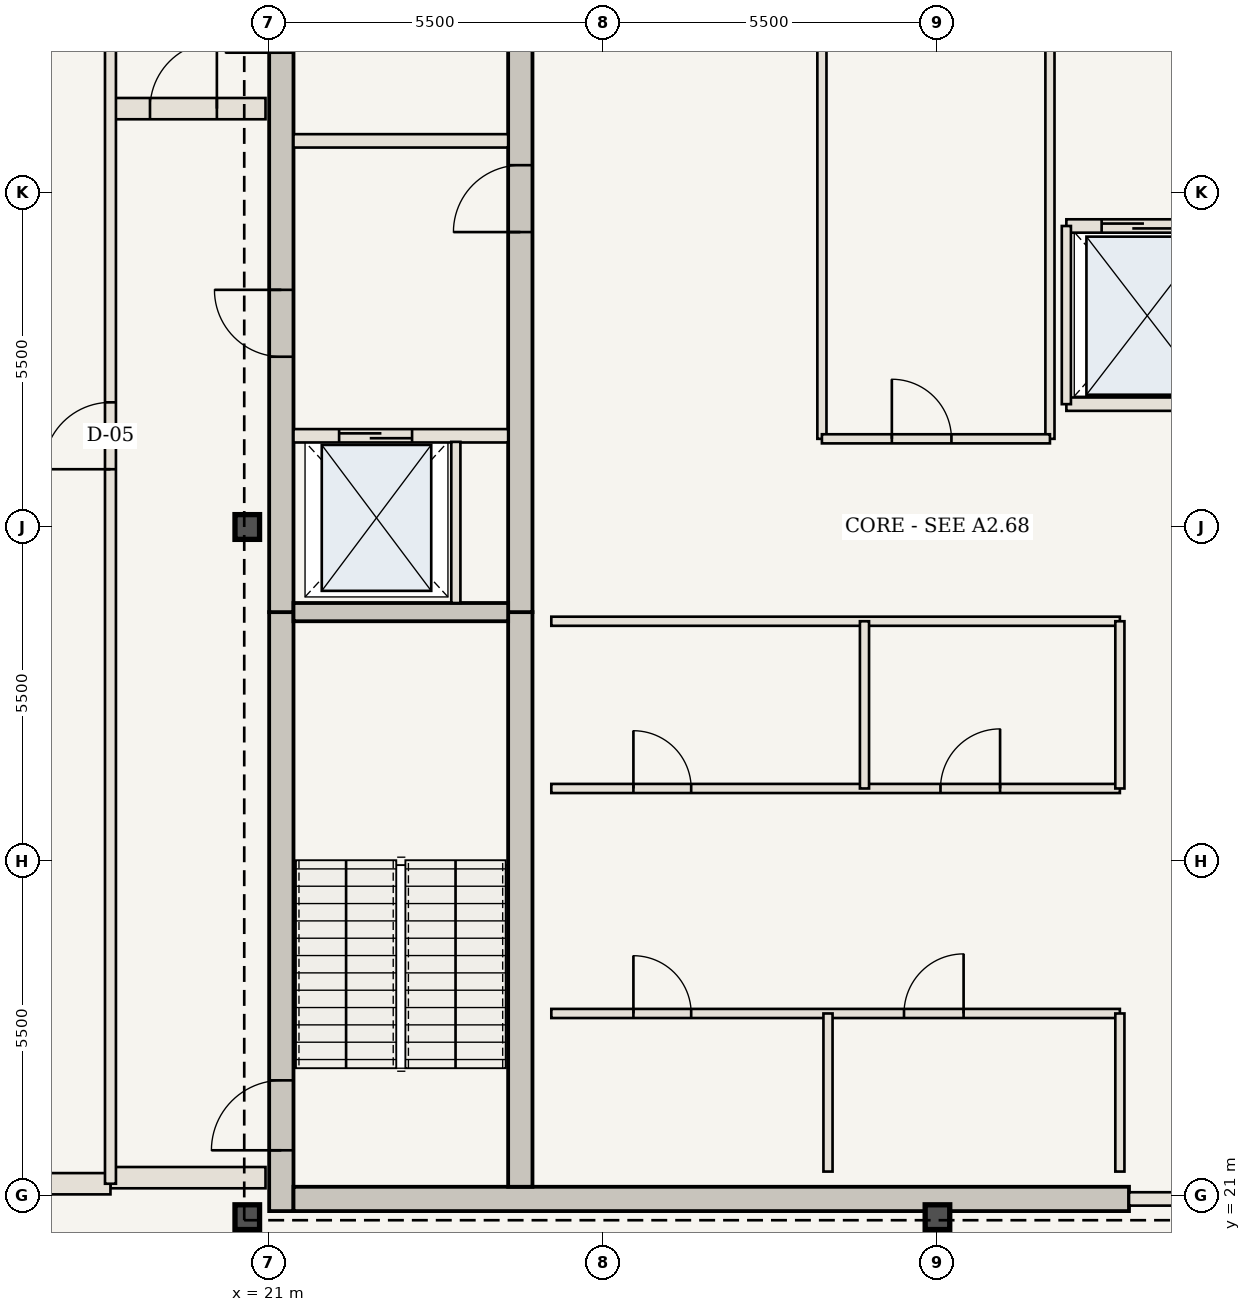
"""IFC4 building model, lengths in metres.
Left out: names, types, materials, properties, quantities, classifications, styles, units other than length and angle.
Written with IfcOpenShell. Run it as: python <this file> out.ifc"""

import sys

from ifc_helpers import new_model, si_unit, direction, frame, frame_2d, origin, origin_2d, place, context, subcontext, project, spatial, rectangle, i_section, extrude, element, fill, save


model = new_model("IFC4")
c1 = context("Model", 3, precision=1e-05, world=origin(), true_north=direction((0.0, 1.0)))
c2 = subcontext(c1, "Body", "Model", "MODEL_VIEW")
j1 = project(units=[si_unit("LENGTHUNIT", "METRE"), si_unit("PLANEANGLEUNIT", "RADIAN")], contexts=[c1])
p1 = place(None, origin())
s1 = spatial("IfcSite", under=j1, at=p1, CompositionType="ELEMENT")
p2 = place(p1, origin())
s2 = spatial("IfcBuilding", under=s1, at=p2, CompositionType="ELEMENT")
p3 = place(p2, frame((0.0, 0.0, 317.8)))
s3 = spatial("IfcBuildingStorey", under=s2, at=p3, CompositionType="ELEMENT", Elevation=317.8)
p4 = place(p3, frame((21.21, 20.75, 0.0), z_axis=(0.0, 0.0, 1.0), x_axis=(0.0, 1.0, 0.0)))
e1 = element("IfcWall", 1, at=p4, inside=s3, PredefinedType="SHEAR", context=c2, shape_type="SweptSolid", body=[
    extrude(rectangle(XDim=9.85, YDim=0.4, at=frame_2d((4.925, 0.0))), origin(), (0.0, 0.0, 1.0), 4.55),
])
p5 = place(p4, frame((1.0, 0.0, 0.0)))
e2 = element("IfcOpeningElement", 2, at=p5, cuts=e1, PredefinedType="OPENING", context=c2, shape_type="SweptSolid", body=[
    extrude(rectangle(XDim=1.15, YDim=2.15, at=frame_2d((0.575, 1.075))), frame((0.0, 0.21, 0.0), z_axis=(0.0, -1.0, 0.0), x_axis=(1.0, 0.0, 0.0)), (0.0, 0.0, 1.0), 0.42),
])
p6 = place(p3, frame((21.21, 30.6, 0.0), z_axis=(0.0, 0.0, 1.0), x_axis=(0.0, 1.0, 0.0)))
e3 = element("IfcWall", 3, at=p6, inside=s3, PredefinedType="SHEAR", context=c2, shape_type="SweptSolid", body=[
    extrude(rectangle(XDim=12.6, YDim=0.4, at=frame_2d((6.3, 0.0))), origin(), (0.0, 0.0, 1.0), 4.55),
])
p7 = place(p6, frame((4.2, 0.0, 0.0)))
e4 = element("IfcOpeningElement", 4, at=p7, cuts=e3, PredefinedType="OPENING", context=c2, shape_type="SweptSolid", body=[
    extrude(rectangle(XDim=1.1, YDim=2.15, at=frame_2d((0.55, 1.075))), frame((0.0, 0.21, 0.0), z_axis=(0.0, -1.0, 0.0), x_axis=(1.0, 0.0, 0.0)), (0.0, 0.0, 1.0), 0.42),
])
p8 = place(p6, frame((9.2, 0.0, 0.0)))
e5 = element("IfcOpeningElement", 5, at=p8, cuts=e3, PredefinedType="OPENING", context=c2, shape_type="SweptSolid", body=[
    extrude(rectangle(XDim=0.92, YDim=2.1, at=frame_2d((0.46, 1.05))), frame((0.0, 0.21, 0.0), z_axis=(0.0, -1.0, 0.0), x_axis=(1.0, 0.0, 0.0)), (0.0, 0.0, 1.0), 0.42),
])
p9 = place(p3, frame((21.41, 20.95, 0.0), z_axis=(0.0, 0.0, 1.0), x_axis=(1.0, 0.0, 0.0)))
e6 = element("IfcWall", 6, at=p9, inside=s3, PredefinedType="SHEAR", context=c2, shape_type="SweptSolid", body=[
    extrude(rectangle(XDim=13.74, YDim=0.4, at=frame_2d((6.87, 0.0))), origin(), (0.0, 0.0, 1.0), 4.55),
])
p10 = place(p3, frame((25.14, 21.15, 0.0), z_axis=(0.0, 0.0, 1.0), x_axis=(0.0, 1.0, 0.0)))
e7 = element("IfcWall", 7, at=p10, inside=s3, PredefinedType="SHEAR", context=c2, shape_type="SweptSolid", body=[
    extrude(rectangle(XDim=9.45, YDim=0.4, at=frame_2d((4.725, 0.0))), origin(), (0.0, 0.0, 1.0), 4.55),
])
p11 = place(p3, frame((25.14, 30.6, 0.0), z_axis=(0.0, 0.0, 1.0), x_axis=(0.0, 1.0, 0.0)))
e8 = element("IfcWall", 8, at=p11, inside=s3, PredefinedType="SHEAR", context=c2, shape_type="SweptSolid", body=[
    extrude(rectangle(XDim=12.2, YDim=0.4, at=frame_2d((6.1, 0.0))), origin(), (0.0, 0.0, 1.0), 4.55),
])
p12 = place(p11, frame((6.25, 0.0, 0.0)))
e9 = element("IfcOpeningElement", 9, at=p12, cuts=e8, PredefinedType="OPENING", context=c2, shape_type="SweptSolid", body=[
    extrude(rectangle(XDim=1.1, YDim=2.15, at=frame_2d((0.55, 1.075))), frame((0.0, 0.21, 0.0), z_axis=(0.0, -1.0, 0.0), x_axis=(1.0, 0.0, 0.0)), (0.0, 0.0, 1.0), 0.42),
])
for number, where, z_axis, x_axis in (
    (10, (20.65, 20.65, 0.0), (0.0, 0.0, 1.0), (1.0, 0.0, 0.0)),
    (11, (32.0, 20.65, 0.0), (0.0, 0.0, 1.0), (1.0, 0.0, 0.0)),
    (12, (20.65, 32.0, 0.0), (0.0, 0.0, 1.0), (1.0, 0.0, 0.0)),
):
    element("IfcColumn", number, at=place(p3, frame(where, z_axis=z_axis, x_axis=x_axis)), inside=s3, PredefinedType="COLUMN", context=c2, shape_type="SweptSolid", body=[
        extrude(i_section(OverallWidth=0.404, OverallDepth=0.407, WebThickness=0.027, FlangeThickness=0.044, at=origin_2d()), origin(), (0.0, 0.0, 1.0), 4.55),
    ])
p13 = place(p3, frame((21.41, 30.6, 0.0), z_axis=(0.0, 0.0, 1.0), x_axis=(1.0, 0.0, 0.0)))
e13 = element("IfcWall", 13, at=p13, inside=s3, PredefinedType="SHEAR", context=c2, shape_type="SweptSolid", body=[
    extrude(rectangle(XDim=3.53, YDim=0.3, at=frame_2d((1.765, 0.0))), origin(), (0.0, 0.0, 1.0), 4.29),
])
p14 = place(p3, frame((21.41, 33.5, 0.0), z_axis=(0.0, 0.0, 1.0), x_axis=(1.0, 0.0, 0.0)))
e14 = element("IfcWall", 14, at=p14, inside=s3, PredefinedType="STANDARD", context=c2, shape_type="SweptSolid", body=[
    extrude(rectangle(XDim=3.53, YDim=0.22, at=frame_2d((1.765, 0.0))), origin(), (0.0, 0.0, 1.0), 4.29),
])
p15 = place(p14, frame((0.75, 0.0, 0.0)))
e15 = element("IfcOpeningElement", 15, at=p15, cuts=e14, PredefinedType="OPENING", context=c2, shape_type="SweptSolid", body=[
    extrude(rectangle(XDim=1.2, YDim=2.2, at=frame_2d((0.6, 1.1))), frame((0.0, 0.12, 0.0), z_axis=(0.0, -1.0, 0.0), x_axis=(1.0, 0.0, 0.0)), (0.0, 0.0, 1.0), 0.24),
])
p16 = place(p3, frame((24.08, 30.75, 0.0), z_axis=(0.0, 0.0, 1.0), x_axis=(0.0, 1.0, 0.0)))
e16 = element("IfcWall", 16, at=p16, inside=s3, PredefinedType="STANDARD", context=c2, shape_type="SweptSolid", body=[
    extrude(rectangle(XDim=2.65, YDim=0.15, at=frame_2d((1.325, 0.0))), origin(), (0.0, 0.0, 1.0), 4.29),
])
p17 = place(p3, frame((21.41, 38.35, 0.0), z_axis=(0.0, 0.0, 1.0), x_axis=(1.0, 0.0, 0.0)))
e17 = element("IfcWall", 17, at=p17, inside=s3, PredefinedType="STANDARD", context=c2, shape_type="SweptSolid", body=[
    extrude(rectangle(XDim=3.53, YDim=0.22, at=frame_2d((1.765, 0.0))), origin(), (0.0, 0.0, 1.0), 4.29),
])
p18 = place(p3, frame((35.15, 20.95, 0.0), z_axis=(0.0, 0.0, 1.0), x_axis=(1.0, 0.0, 0.0)))
e18 = element("IfcWall", 18, at=p18, inside=s3, PredefinedType="STANDARD", context=c2, shape_type="SweptSolid", body=[
    extrude(rectangle(XDim=3.3, YDim=0.22, at=frame_2d((1.65, 0.0))), origin(), (0.0, 0.0, 1.0), 4.29),
])
p19 = place(p18, frame((1.1, 0.0, 0.0)))
e19 = element("IfcOpeningElement", 19, at=p19, cuts=e18, PredefinedType="OPENING", context=c2, shape_type="SweptSolid", body=[
    extrude(rectangle(XDim=1.1, YDim=2.15, at=frame_2d((0.55, 1.075))), frame((0.0, 0.12, 0.0), z_axis=(0.0, -1.0, 0.0), x_axis=(1.0, 0.0, 0.0)), (0.0, 0.0, 1.0), 0.24),
])
p20 = place(p3, frame((25.65, 24.0, 0.0), z_axis=(0.0, 0.0, 1.0), x_axis=(1.0, 0.0, 0.0)))
e20 = element("IfcWall", 20, at=p20, inside=s3, PredefinedType="STANDARD", context=c2, shape_type="SweptSolid", body=[
    extrude(rectangle(XDim=9.35, YDim=0.15, at=frame_2d((4.675, 0.0))), origin(), (0.0, 0.0, 1.0), 4.29),
])
p21 = place(p20, frame((1.35, 0.0, 0.0)))
e21 = element("IfcOpeningElement", 21, at=p21, cuts=e20, PredefinedType="OPENING", context=c2, shape_type="SweptSolid", body=[
    extrude(rectangle(XDim=0.95, YDim=2.15, at=frame_2d((0.475, 1.075))), frame((0.0, 0.085, 0.0), z_axis=(0.0, -1.0, 0.0), x_axis=(1.0, 0.0, 0.0)), (0.0, 0.0, 1.0), 0.17),
])
p22 = place(p20, frame((5.8, 0.0, 0.0)))
e22 = element("IfcOpeningElement", 22, at=p22, cuts=e20, PredefinedType="OPENING", context=c2, shape_type="SweptSolid", body=[
    extrude(rectangle(XDim=0.98, YDim=2.2, at=frame_2d((0.49, 1.1))), frame((0.0, 0.085, 0.0), z_axis=(0.0, -1.0, 0.0), x_axis=(1.0, 0.0, 0.0)), (0.0, 0.0, 1.0), 0.17),
])
for number, where, z_axis, x_axis in (
    (23, (30.2, 21.4, 0.0), (0.0, 0.0, 1.0), (0.0, 1.0, 0.0)),
    (24, (35.0, 21.4, 0.0), (0.0, 0.0, 1.0), (0.0, 1.0, 0.0)),
):
    element("IfcWall", number, at=place(p3, frame(where, z_axis=z_axis, x_axis=x_axis)), inside=s3, PredefinedType="STANDARD", context=c2, shape_type="SweptSolid", body=[
        extrude(rectangle(XDim=2.6, YDim=0.15, at=frame_2d((1.3, 0.0))), origin(), (0.0, 0.0, 1.0), 4.29),
    ])
p23 = place(p3, frame((25.65, 27.7, 0.0), z_axis=(0.0, 0.0, 1.0), x_axis=(1.0, 0.0, 0.0)))
e25 = element("IfcWall", 25, at=p23, inside=s3, PredefinedType="STANDARD", context=c2, shape_type="SweptSolid", body=[
    extrude(rectangle(XDim=9.35, YDim=0.15, at=frame_2d((4.675, 0.0))), origin(), (0.0, 0.0, 1.0), 4.29),
])
p24 = place(p23, frame((1.35, 0.0, 0.0)))
e26 = element("IfcOpeningElement", 26, at=p24, cuts=e25, PredefinedType="OPENING", context=c2, shape_type="SweptSolid", body=[
    extrude(rectangle(XDim=0.95, YDim=2.15, at=frame_2d((0.475, 1.075))), frame((0.0, 0.085, 0.0), z_axis=(0.0, -1.0, 0.0), x_axis=(1.0, 0.0, 0.0)), (0.0, 0.0, 1.0), 0.17),
])
p25 = place(p23, frame((6.4, 0.0, 0.0)))
e27 = element("IfcOpeningElement", 27, at=p25, cuts=e25, PredefinedType="OPENING", context=c2, shape_type="SweptSolid", body=[
    extrude(rectangle(XDim=0.98, YDim=2.2, at=frame_2d((0.49, 1.1))), frame((0.0, 0.085, 0.0), z_axis=(0.0, -1.0, 0.0), x_axis=(1.0, 0.0, 0.0)), (0.0, 0.0, 1.0), 0.17),
])
p26 = place(p3, frame((25.65, 30.45, 0.0), z_axis=(0.0, 0.0, 1.0), x_axis=(1.0, 0.0, 0.0)))
e28 = element("IfcWall", 28, at=p26, inside=s3, PredefinedType="STANDARD", context=c2, shape_type="SweptSolid", body=[
    extrude(rectangle(XDim=9.35, YDim=0.15, at=frame_2d((4.675, 0.0))), origin(), (0.0, 0.0, 1.0), 4.29),
])
for number, where, z_axis, x_axis in (
    (29, (30.8, 27.7, 0.0), (0.0, 0.0, 1.0), (0.0, 1.0, 0.0)),
    (30, (35.0, 27.7, 0.0), (0.0, 0.0, 1.0), (0.0, 1.0, 0.0)),
):
    element("IfcWall", number, at=place(p3, frame(where, z_axis=z_axis, x_axis=x_axis)), inside=s3, PredefinedType="STANDARD", context=c2, shape_type="SweptSolid", body=[
        extrude(rectangle(XDim=2.75, YDim=0.15, at=frame_2d((1.375, 0.0))), origin(), (0.0, 0.0, 1.0), 4.29),
    ])
for number, where, z_axis, x_axis in (
    (31, (30.1, 33.45, 0.0), (0.0, 0.0, 1.0), (0.0, 1.0, 0.0)),
    (32, (33.85, 33.45, 0.0), (0.0, 0.0, 1.0), (0.0, 1.0, 0.0)),
):
    element("IfcWall", number, at=place(p3, frame(where, z_axis=z_axis, x_axis=x_axis)), inside=s3, PredefinedType="STANDARD", context=c2, shape_type="SweptSolid", body=[
        extrude(rectangle(XDim=9.2, YDim=0.15, at=frame_2d((4.6, 0.0))), origin(), (0.0, 0.0, 1.0), 4.29),
    ])
p27 = place(p3, frame((30.1, 33.45, 0.0), z_axis=(0.0, 0.0, 1.0), x_axis=(1.0, 0.0, 0.0)))
e33 = element("IfcWall", 33, at=p27, inside=s3, PredefinedType="STANDARD", context=c2, shape_type="SweptSolid", body=[
    extrude(rectangle(XDim=3.75, YDim=0.15, at=frame_2d((1.875, 0.0))), origin(), (0.0, 0.0, 1.0), 4.29),
])
p28 = place(p27, frame((1.15, 0.0, 0.0)))
e34 = element("IfcOpeningElement", 34, at=p28, cuts=e33, PredefinedType="OPENING", context=c2, shape_type="SweptSolid", body=[
    extrude(rectangle(XDim=0.98, YDim=2.2, at=frame_2d((0.49, 1.1))), frame((0.0, 0.085, 0.0), z_axis=(0.0, -1.0, 0.0), x_axis=(1.0, 0.0, 0.0)), (0.0, 0.0, 1.0), 0.17),
])
p29 = place(p3, frame((34.12, 36.95, 0.0), z_axis=(0.0, 0.0, 1.0), x_axis=(1.0, 0.0, 0.0)))
e35 = element("IfcWall", 35, at=p29, inside=s3, PredefinedType="STANDARD", context=c2, shape_type="SweptSolid", body=[
    extrude(rectangle(XDim=2.68, YDim=0.22, at=frame_2d((1.34, 0.0))), origin(), (0.0, 0.0, 1.0), 4.29),
])
p30 = place(p29, frame((0.58, 0.0, 0.0)))
e36 = element("IfcOpeningElement", 36, at=p30, cuts=e35, PredefinedType="OPENING", context=c2, shape_type="SweptSolid", body=[
    extrude(rectangle(XDim=1.2, YDim=2.2, at=frame_2d((0.6, 1.1))), frame((0.0, 0.12, 0.0), z_axis=(0.0, -1.0, 0.0), x_axis=(1.0, 0.0, 0.0)), (0.0, 0.0, 1.0), 0.24),
])
p31 = place(p3, frame((34.12, 34.02, 0.0), z_axis=(0.0, 0.0, 1.0), x_axis=(1.0, 0.0, 0.0)))
e37 = element("IfcWall", 37, at=p31, inside=s3, PredefinedType="STANDARD", context=c2, shape_type="SweptSolid", body=[
    extrude(rectangle(XDim=2.68, YDim=0.22, at=frame_2d((1.34, 0.0))), origin(), (0.0, 0.0, 1.0), 4.29),
])
p32 = place(p3, frame((34.12, 34.02, 0.0), z_axis=(0.0, 0.0, 1.0), x_axis=(0.0, 1.0, 0.0)))
e38 = element("IfcWall", 38, at=p32, inside=s3, PredefinedType="STANDARD", context=c2, shape_type="SweptSolid", body=[
    extrude(rectangle(XDim=2.93, YDim=0.15, at=frame_2d((1.465, 0.0))), origin(), (0.0, 0.0, 1.0), 4.29),
])
p33 = place(p3, frame((18.4, 21.3, 0.0), z_axis=(0.0, 0.0, 1.0), x_axis=(1.0, 0.0, 0.0)))
e39 = element("IfcWall", 39, at=p33, inside=s3, PredefinedType="STANDARD", context=c2, shape_type="SweptSolid", body=[
    extrude(rectangle(XDim=2.55, YDim=0.35, at=frame_2d((1.275, 0.0))), origin(), (0.0, 0.0, 1.0), 4.29),
])
p34 = place(p3, frame((18.4, 38.88, 0.0), z_axis=(0.0, 0.0, 1.0), x_axis=(1.0, 0.0, 0.0)))
e40 = element("IfcWall", 40, at=p34, inside=s3, PredefinedType="STANDARD", context=c2, shape_type="SweptSolid", body=[
    extrude(rectangle(XDim=2.55, YDim=0.35, at=frame_2d((1.275, 0.0))), origin(), (0.0, 0.0, 1.0), 4.29),
])
p35 = place(p34, frame((0.65, 0.0, 0.0)))
e41 = element("IfcOpeningElement", 41, at=p35, cuts=e40, PredefinedType="OPENING", context=c2, shape_type="SweptSolid", body=[
    extrude(rectangle(XDim=1.1, YDim=2.15, at=frame_2d((0.55, 1.075))), frame((0.0, 0.185, 0.0), z_axis=(0.0, -1.0, 0.0), x_axis=(1.0, 0.0, 0.0)), (0.0, 0.0, 1.0), 0.37),
])
p36 = place(p3, frame((9.56, 21.2, 0.0), z_axis=(0.0, 0.0, 1.0), x_axis=(1.0, 0.0, 0.0)))
e42 = element("IfcWall", 42, at=p36, inside=s3, PredefinedType="STANDARD", context=c2, shape_type="SweptSolid", body=[
    extrude(rectangle(XDim=8.84, YDim=0.35, at=frame_2d((4.42, 0.0))), origin(), (0.0, 0.0, 1.0), 4.29),
])
p37 = place(p3, frame((18.4, 21.2, 0.0), z_axis=(0.0, 0.0, 1.0), x_axis=(0.0, 1.0, 0.0)))
e43 = element("IfcWall", 43, at=p37, inside=s3, PredefinedType="STANDARD", context=c2, shape_type="SweptSolid", body=[
    extrude(rectangle(XDim=21.6, YDim=0.18, at=frame_2d((10.8, 0.0))), origin(), (0.0, 0.0, 1.0), 4.29),
])
p38 = place(p37, frame((11.75, 0.0, 0.0)))
e44 = element("IfcOpeningElement", 44, at=p38, cuts=e43, PredefinedType="OPENING", context=c2, shape_type="SweptSolid", body=[
    extrude(rectangle(XDim=1.1, YDim=2.15, at=frame_2d((0.55, 1.075))), frame((0.0, 0.1, 0.0), z_axis=(0.0, -1.0, 0.0), x_axis=(1.0, 0.0, 0.0)), (0.0, 0.0, 1.0), 0.2),
])
p39 = place(p5, origin())
e45 = element("IfcDoor", 45, at=p39, inside=s3, OperationType="SINGLE_SWING_LEFT", PredefinedType="DOOR", context=c2, shape_type="SweptSolid", body=[
    extrude(rectangle(XDim=1.15, YDim=2.15, at=frame_2d((0.575, 1.075))), frame((0.0, 0.025, 0.0), z_axis=(0.0, -1.0, 0.0), x_axis=(1.0, 0.0, 0.0)), (0.0, 0.0, 1.0), 0.05),
])
fill(e2, e45)
p40 = place(p7, origin())
e46 = element("IfcDoor", 46, at=p40, inside=s3, OperationType="SINGLE_SWING_RIGHT", PredefinedType="DOOR", context=c2, shape_type="SweptSolid", body=[
    extrude(rectangle(XDim=1.1, YDim=2.15, at=frame_2d((0.55, 1.075))), frame((0.0, 0.025, 0.0), z_axis=(0.0, -1.0, 0.0), x_axis=(1.0, 0.0, 0.0)), (0.0, 0.0, 1.0), 0.05),
])
fill(e4, e46)
p41 = place(p12, origin())
e47 = element("IfcDoor", 47, at=p41, inside=s3, OperationType="SINGLE_SWING_LEFT", PredefinedType="DOOR", context=c2, shape_type="SweptSolid", body=[
    extrude(rectangle(XDim=1.1, YDim=2.15, at=frame_2d((0.55, 1.075))), frame((0.0, 0.025, 0.0), z_axis=(0.0, -1.0, 0.0), x_axis=(1.0, 0.0, 0.0)), (0.0, 0.0, 1.0), 0.05),
])
fill(e9, e47)
p42 = place(p15, origin())
e48 = element("IfcDoor", 48, at=p42, inside=s3, OperationType="DOUBLE_DOOR_SLIDING", PredefinedType="DOOR", context=c2, shape_type="SweptSolid", body=[
    extrude(rectangle(XDim=1.2, YDim=2.2, at=frame_2d((0.6, 1.1))), frame((0.0, 0.025, 0.0), z_axis=(0.0, -1.0, 0.0), x_axis=(1.0, 0.0, 0.0)), (0.0, 0.0, 1.0), 0.05),
])
fill(e15, e48)
p43 = place(p21, origin())
e49 = element("IfcDoor", 49, at=p43, inside=s3, OperationType="SINGLE_SWING_LEFT", PredefinedType="DOOR", context=c2, shape_type="SweptSolid", body=[
    extrude(rectangle(XDim=0.95, YDim=2.15, at=frame_2d((0.475, 1.075))), frame((0.0, 0.025, 0.0), z_axis=(0.0, -1.0, 0.0), x_axis=(1.0, 0.0, 0.0)), (0.0, 0.0, 1.0), 0.05),
])
fill(e21, e49)
p44 = place(p22, origin())
e50 = element("IfcDoor", 50, at=p44, inside=s3, OperationType="SINGLE_SWING_RIGHT", PredefinedType="DOOR", context=c2, shape_type="SweptSolid", body=[
    extrude(rectangle(XDim=0.98, YDim=2.2, at=frame_2d((0.49, 1.1))), frame((0.0, 0.025, 0.0), z_axis=(0.0, -1.0, 0.0), x_axis=(1.0, 0.0, 0.0)), (0.0, 0.0, 1.0), 0.05),
])
fill(e22, e50)
p45 = place(p24, origin())
e51 = element("IfcDoor", 51, at=p45, inside=s3, OperationType="SINGLE_SWING_LEFT", PredefinedType="DOOR", context=c2, shape_type="SweptSolid", body=[
    extrude(rectangle(XDim=0.95, YDim=2.15, at=frame_2d((0.475, 1.075))), frame((0.0, 0.025, 0.0), z_axis=(0.0, -1.0, 0.0), x_axis=(1.0, 0.0, 0.0)), (0.0, 0.0, 1.0), 0.05),
])
fill(e26, e51)
p46 = place(p25, origin())
e52 = element("IfcDoor", 52, at=p46, inside=s3, OperationType="SINGLE_SWING_RIGHT", PredefinedType="DOOR", context=c2, shape_type="SweptSolid", body=[
    extrude(rectangle(XDim=0.98, YDim=2.2, at=frame_2d((0.49, 1.1))), frame((0.0, 0.025, 0.0), z_axis=(0.0, -1.0, 0.0), x_axis=(1.0, 0.0, 0.0)), (0.0, 0.0, 1.0), 0.05),
])
fill(e27, e52)
p47 = place(p28, origin())
e53 = element("IfcDoor", 53, at=p47, inside=s3, OperationType="SINGLE_SWING_LEFT", PredefinedType="DOOR", context=c2, shape_type="SweptSolid", body=[
    extrude(rectangle(XDim=0.98, YDim=2.2, at=frame_2d((0.49, 1.1))), frame((0.0, 0.025, 0.0), z_axis=(0.0, -1.0, 0.0), x_axis=(1.0, 0.0, 0.0)), (0.0, 0.0, 1.0), 0.05),
])
fill(e34, e53)
p48 = place(p30, origin())
e54 = element("IfcDoor", 54, at=p48, inside=s3, OperationType="DOUBLE_DOOR_SLIDING", PredefinedType="DOOR", context=c2, shape_type="SweptSolid", body=[
    extrude(rectangle(XDim=1.2, YDim=2.2, at=frame_2d((0.6, 1.1))), frame((0.0, 0.025, 0.0), z_axis=(0.0, -1.0, 0.0), x_axis=(1.0, 0.0, 0.0)), (0.0, 0.0, 1.0), 0.05),
])
fill(e36, e54)
p49 = place(p35, origin())
e55 = element("IfcDoor", 55, at=p49, inside=s3, OperationType="SINGLE_SWING_RIGHT", PredefinedType="DOOR", context=c2, shape_type="SweptSolid", body=[
    extrude(rectangle(XDim=1.1, YDim=2.15, at=frame_2d((0.55, 1.075))), frame((0.0, 0.025, 0.0), z_axis=(0.0, -1.0, 0.0), x_axis=(1.0, 0.0, 0.0)), (0.0, 0.0, 1.0), 0.05),
])
fill(e41, e55)
p50 = place(p38, origin())
e56 = element("IfcDoor", 56, at=p50, inside=s3, OperationType="SINGLE_SWING_LEFT", PredefinedType="DOOR", context=c2, shape_type="SweptSolid", body=[
    extrude(rectangle(XDim=1.1, YDim=2.15, at=frame_2d((0.55, 1.075))), frame((0.0, 0.025, 0.0), z_axis=(0.0, -1.0, 0.0), x_axis=(1.0, 0.0, 0.0)), (0.0, 0.0, 1.0), 0.05),
])
fill(e44, e56)
save(model, sys.argv[1])
